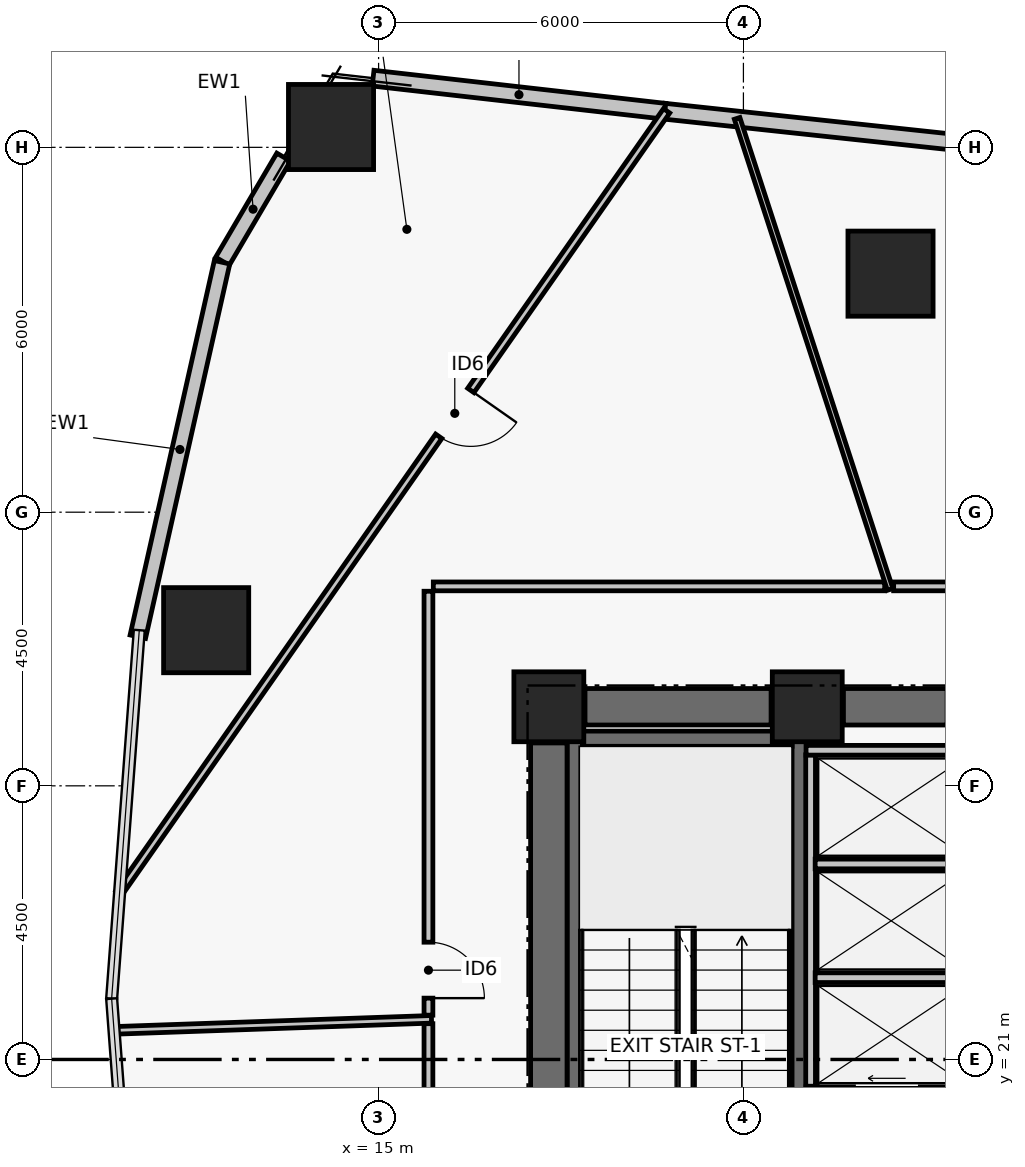
"""IFC4 building model, lengths in metres.
Left out: names, types, materials, properties, quantities, classifications, styles, units other than length and angle.
Written with IfcOpenShell. Run it as: python <this file> out.ifc"""

import sys

from ifc_helpers import new_model, si_unit, direction, frame, frame_2d, origin, origin_2d, place, context, subcontext, project, spatial, rectangle, hollow_rectangle, extrude, element, fill, save


model = new_model("IFC4")
c1 = context("Model", 3, precision=1e-05, world=origin(), true_north=direction((0.0, 1.0)))
c2 = subcontext(c1, "Body", "Model", "MODEL_VIEW")
j1 = project(units=[si_unit("LENGTHUNIT", "METRE"), si_unit("PLANEANGLEUNIT", "RADIAN")], contexts=[c1])
p1 = place(None, origin())
s1 = spatial("IfcSite", under=j1, at=p1, CompositionType="ELEMENT")
p2 = place(p1, origin())
s2 = spatial("IfcBuilding", under=s1, at=p2, CompositionType="ELEMENT")
p3 = place(p2, frame((0.0, 0.0, 61.08)))
s3 = spatial("IfcBuildingStorey", under=s2, at=p3, CompositionType="ELEMENT", Elevation=61.08)
for number, where, z_axis, x_axis in (
    (1, (17.8, 26.8, 0.0), (0.0, 0.0, 1.0), (1.0, 0.0, 0.0)),
    (2, (22.05, 26.8, 0.0), (0.0, 0.0, 1.0), (1.0, 0.0, 0.0)),
):
    element("IfcColumn", number, at=place(p3, frame(where, z_axis=z_axis, x_axis=x_axis)), inside=s3, PredefinedType="COLUMN", context=c2, shape_type="SweptSolid", body=[
        extrude(rectangle(XDim=1.15, YDim=1.15, at=origin_2d()), origin(), (0.0, 0.0, 1.0), 3.72),
    ])
p4 = place(p3, frame((18.395, 26.8, 0.0), z_axis=(0.0, 0.0, 1.0), x_axis=(1.0, 0.0, 0.0)))
e3 = element("IfcWall", 3, at=p4, inside=s3, PredefinedType="SHEAR", context=c2, shape_type="SweptSolid", body=[
    extrude(rectangle(XDim=3.06, YDim=0.6, at=frame_2d((1.53, 0.0))), origin(), (0.0, 0.0, 1.0), 3.47),
])
p5 = place(p3, frame((22.645, 26.8, 0.0), z_axis=(0.0, 0.0, 1.0), x_axis=(1.0, 0.0, 0.0)))
e4 = element("IfcWall", 4, at=p5, inside=s3, PredefinedType="SHEAR", context=c2, shape_type="SweptSolid", body=[
    extrude(rectangle(XDim=1.705, YDim=0.6, at=frame_2d((0.853, 0.0))), origin(), (0.0, 0.0, 1.0), 3.47),
])
p6 = place(p3, frame((17.8, 17.795, 0.0), z_axis=(0.0, 0.0, 1.0), x_axis=(0.0, 1.0, 0.0)))
e5 = element("IfcWall", 5, at=p6, inside=s3, PredefinedType="SHEAR", context=c2, shape_type="SweptSolid", body=[
    extrude(rectangle(XDim=8.41, YDim=0.6, at=frame_2d((4.205, 0.0))), origin(), (0.0, 0.0, 1.0), 3.47),
])
p7 = place(p3, frame((18.229, 17.6, 0.0), z_axis=(0.0, 0.0, 1.0), x_axis=(0.0, 1.0, 0.0)))
e6 = element("IfcWall", 6, at=p7, inside=s3, PredefinedType="SHEAR", context=c2, shape_type="SweptSolid", body=[
    extrude(rectangle(XDim=8.8, YDim=0.25, at=frame_2d((4.4, 0.0))), origin(), (0.0, 0.0, 1.0), 3.47),
])
p8 = place(p3, frame((21.925, 17.6, 0.0), z_axis=(0.0, 0.0, 1.0), x_axis=(0.0, 1.0, 0.0)))
e7 = element("IfcWall", 7, at=p8, inside=s3, PredefinedType="SHEAR", context=c2, shape_type="SweptSolid", body=[
    extrude(rectangle(XDim=8.8, YDim=0.25, at=frame_2d((4.4, 0.0))), origin(), (0.0, 0.0, 1.0), 3.47),
])
p9 = place(p8, frame((0.35, 0.0, 0.0)))
e8 = element("IfcOpeningElement", 8, at=p9, cuts=e7, PredefinedType="OPENING", context=c2, shape_type="SweptSolid", body=[
    extrude(rectangle(XDim=1.05, YDim=2.08, at=frame_2d((0.525, 1.04))), frame((0.0, 0.135, 0.0), z_axis=(0.0, -1.0, 0.0), x_axis=(1.0, 0.0, 0.0)), (0.0, 0.0, 1.0), 0.27),
])
p10 = place(p3, frame((18.354, 26.275, 0.0), z_axis=(0.0, 0.0, 1.0), x_axis=(1.0, 0.0, 0.0)))
e9 = element("IfcWall", 9, at=p10, inside=s3, PredefinedType="SHEAR", context=c2, shape_type="SweptSolid", body=[
    extrude(rectangle(XDim=3.446, YDim=0.25, at=frame_2d((1.723, 0.0))), origin(), (0.0, 0.0, 1.0), 3.47),
])
for number, where, z_axis, x_axis in (
    (10, (23.419, 33.923, 0.0), (0.0, 0.0, 1.0), (1.0, 0.0, 0.0)),
    (11, (14.218, 36.334, 0.0), (0.0, 0.0, 1.0), (1.0, 0.0, 0.0)),
    (12, (12.164, 28.06, 0.0), (0.0, 0.0, 1.0), (1.0, 0.0, 0.0)),
):
    element("IfcColumn", number, at=place(p3, frame(where, z_axis=z_axis, x_axis=x_axis)), inside=s3, PredefinedType="COLUMN", context=c2, shape_type="SweptSolid", body=[
        extrude(hollow_rectangle(XDim=1.4, YDim=1.4, WallThickness=0.055, at=origin_2d()), origin(), (0.0, 0.0, 1.0), 3.72),
    ])
p11 = place(p3, frame((19.696, 36.595, 0.0), z_axis=(0.0, 0.0, 1.0), x_axis=(0.994319088673, -0.106440358419, 0.0)))
e13 = element("IfcWall", 13, at=p11, inside=s3, PredefinedType="PARTITIONING", context=c2, shape_type="SweptSolid", body=[
    extrude(rectangle(XDim=9.757, YDim=0.26, at=frame_2d((4.879, 0.0))), origin(), (0.0, 0.0, 1.0), 3.47),
])
p12 = place(p3, frame((14.909, 37.138, 0.0), z_axis=(0.0, 0.0, 1.0), x_axis=(0.993630237788, -0.112689620435, 0.0)))
e14 = element("IfcWall", 14, at=p12, inside=s3, PredefinedType="PARTITIONING", context=c2, shape_type="SweptSolid", body=[
    extrude(rectangle(XDim=4.829, YDim=0.26, at=frame_2d((2.415, 0.0))), origin(), (0.0, 0.0, 1.0), 3.47),
])
p13 = place(p3, frame((12.432, 34.127, 0.0), z_axis=(0.0, 0.0, 1.0), x_axis=(0.506772954594, 0.862079562739, 0.0)))
e15 = element("IfcWall", 15, at=p13, inside=s3, PredefinedType="PARTITIONING", context=c2, shape_type="SweptSolid", body=[
    extrude(rectangle(XDim=1.986, YDim=0.26, at=frame_2d((0.993, 0.0))), origin(), (0.0, 0.0, 1.0), 3.47),
])
p14 = place(p3, frame((11.04, 27.952, 0.0), z_axis=(0.0, 0.0, 1.0), x_axis=(0.219505752381, 0.975611205692, 0.0)))
e16 = element("IfcWall", 16, at=p14, inside=s3, PredefinedType="PARTITIONING", context=c2, shape_type="SweptSolid", body=[
    extrude(rectangle(XDim=6.312, YDim=0.26, at=frame_2d((3.156, 0.0))), origin(), (0.0, 0.0, 1.0), 3.47),
])
p15 = place(p3, frame((22.03, 20.45, 0.0), z_axis=(0.0, 0.0, 1.0), x_axis=(1.0, 0.0, 0.0)))
e17 = element("IfcWall", 17, at=p15, inside=s3, PredefinedType="PARTITIONING", context=c2, shape_type="SweptSolid", body=[
    extrude(rectangle(XDim=2.8, YDim=0.2, at=frame_2d((1.4, 0.0))), origin(), (0.0, 0.0, 1.0), 3.47),
])
p16 = place(p15, frame((0.78, 0.0, 0.0)))
e18 = element("IfcOpeningElement", 18, at=p16, cuts=e17, PredefinedType="OPENING", context=c2, shape_type="SweptSolid", body=[
    extrude(rectangle(XDim=1.1, YDim=2.08, at=frame_2d((0.55, 1.04))), frame((0.0, 0.11, 0.0), z_axis=(0.0, -1.0, 0.0), x_axis=(1.0, 0.0, 0.0)), (0.0, 0.0, 1.0), 0.22),
])
p17 = place(p3, frame((22.105, 20.56, 0.0), z_axis=(0.0, 0.0, 1.0), x_axis=(0.0, 1.0, 0.0)))
e19 = element("IfcWall", 19, at=p17, inside=s3, PredefinedType="PARTITIONING", context=c2, shape_type="SweptSolid", body=[
    extrude(rectangle(XDim=5.45, YDim=0.16, at=frame_2d((2.725, 0.0))), origin(), (0.0, 0.0, 1.0), 3.47),
])
p18 = place(p3, frame((22.18, 22.345, 0.0), z_axis=(0.0, 0.0, 1.0), x_axis=(1.0, 0.0, 0.0)))
e20 = element("IfcWall", 20, at=p18, inside=s3, PredefinedType="PARTITIONING", context=c2, shape_type="SweptSolid", body=[
    extrude(rectangle(XDim=2.65, YDim=0.16, at=frame_2d((1.325, 0.0))), origin(), (0.0, 0.0, 1.0), 3.47),
])
p19 = place(p3, frame((22.18, 24.215, 0.0), z_axis=(0.0, 0.0, 1.0), x_axis=(1.0, 0.0, 0.0)))
e21 = element("IfcWall", 21, at=p19, inside=s3, PredefinedType="PARTITIONING", context=c2, shape_type="SweptSolid", body=[
    extrude(rectangle(XDim=2.49, YDim=0.16, at=frame_2d((1.245, 0.0))), origin(), (0.0, 0.0, 1.0), 3.47),
])
p20 = place(p3, frame((22.03, 26.085, 0.0), z_axis=(0.0, 0.0, 1.0), x_axis=(1.0, 0.0, 0.0)))
e22 = element("IfcWall", 22, at=p20, inside=s3, PredefinedType="PARTITIONING", context=c2, shape_type="SweptSolid", body=[
    extrude(rectangle(XDim=2.83, YDim=0.16, at=frame_2d((1.415, 0.0))), origin(), (0.0, 0.0, 1.0), 3.47),
])
p21 = place(p3, frame((15.82, 21.588, 0.0), z_axis=(0.0, 0.0, 1.0), x_axis=(0.0, -1.0, 0.0)))
e23 = element("IfcWall", 23, at=p21, inside=s3, PredefinedType="PARTITIONING", context=c2, shape_type="SweptSolid", body=[
    extrude(rectangle(XDim=8.298, YDim=0.145, at=frame_2d((4.149, 0.0))), origin(), (0.0, 0.0, 1.0), 2.6),
])
p22 = place(p3, frame((32.8, 28.78, 0.0), z_axis=(0.0, 0.0, 1.0), x_axis=(-1.0, 0.0, 0.0)))
e24 = element("IfcWall", 24, at=p22, inside=s3, PredefinedType="PARTITIONING", context=c2, shape_type="SweptSolid", body=[
    extrude(rectangle(XDim=9.329, YDim=0.145, at=frame_2d((4.665, 0.0))), origin(), (0.0, 0.0, 1.0), 3.0),
])
p23 = place(p22, frame((7.148, 0.0, 0.0)))
e25 = element("IfcOpeningElement", 25, at=p23, cuts=e24, PredefinedType="OPENING", context=c2, shape_type="SweptSolid", body=[
    extrude(rectangle(XDim=0.92, YDim=2.05, at=frame_2d((0.46, 1.025))), frame((0.0, 0.083, 0.0), z_axis=(0.0, -1.0, 0.0), x_axis=(1.0, 0.0, 0.0)), (0.0, 0.0, 1.0), 0.165),
])
p24 = place(p3, frame((23.323, 28.78, 0.0), z_axis=(0.0, 0.0, 1.0), x_axis=(-1.0, 0.0, 0.0)))
e26 = element("IfcWall", 26, at=p24, inside=s3, PredefinedType="PARTITIONING", context=c2, shape_type="SweptSolid", body=[
    extrude(rectangle(XDim=7.424, YDim=0.145, at=frame_2d((3.712, 0.0))), origin(), (0.0, 0.0, 1.0), 2.6),
])
p25 = place(p3, frame((15.82, 28.7, 0.0), z_axis=(0.0, 0.0, 1.0), x_axis=(0.0, -1.0, 0.0)))
e27 = element("IfcWall", 27, at=p25, inside=s3, PredefinedType="PARTITIONING", context=c2, shape_type="SweptSolid", body=[
    extrude(rectangle(XDim=6.971, YDim=0.145, at=frame_2d((3.486, 0.0))), origin(), (0.0, 0.0, 1.0), 2.6),
])
p26 = place(p25, frame((5.771, 0.0, 0.0)))
e28 = element("IfcOpeningElement", 28, at=p26, cuts=e27, PredefinedType="OPENING", context=c2, shape_type="SweptSolid", body=[
    extrude(rectangle(XDim=0.92, YDim=2.05, at=frame_2d((0.46, 1.025))), frame((0.0, 0.083, 0.0), z_axis=(0.0, -1.0, 0.0), x_axis=(1.0, 0.0, 0.0)), (0.0, 0.0, 1.0), 0.165),
])
p27 = place(p3, frame((23.413, 28.73, 0.0), z_axis=(0.0, 0.0, 1.0), x_axis=(-0.309033883912, 0.951051028386, 0.0)))
e29 = element("IfcWall", 29, at=p27, inside=s3, PredefinedType="PARTITIONING", context=c2, shape_type="SweptSolid", body=[
    extrude(rectangle(XDim=8.145, YDim=0.095, at=frame_2d((4.073, 0.0))), origin(), (0.0, 0.0, 1.0), 2.6),
])
p28 = place(p3, frame((15.87, 21.66, 0.0), z_axis=(0.0, 0.0, 1.0), x_axis=(-0.999391229301, -0.034887974962, 0.0)))
e30 = element("IfcWall", 30, at=p28, inside=s3, PredefinedType="PARTITIONING", context=c2, shape_type="SweptSolid", body=[
    extrude(rectangle(XDim=5.234, YDim=0.125, at=frame_2d((2.617, 0.0))), origin(), (0.0, 0.0, 1.0), 2.85),
])
p29 = place(p3, frame((19.737, 36.601, 0.0), z_axis=(0.0, 0.0, 1.0), x_axis=(-0.573585467262, -0.819145720703, 0.0)))
e31 = element("IfcWall", 31, at=p29, inside=s3, PredefinedType="PARTITIONING", context=c2, shape_type="SweptSolid", body=[
    extrude(rectangle(XDim=15.703, YDim=0.125, at=frame_2d((7.851, 0.0))), origin(), (0.0, 0.0, 1.0), 2.6),
])
p30 = place(p29, frame((5.614, 0.0, 0.0)))
e32 = element("IfcOpeningElement", 32, at=p30, cuts=e31, PredefinedType="OPENING", context=c2, shape_type="SweptSolid", body=[
    extrude(rectangle(XDim=0.92, YDim=2.05, at=frame_2d((0.46, 1.025))), frame((0.0, 0.073, 0.0), z_axis=(0.0, -1.0, 0.0), x_axis=(1.0, 0.0, 0.0)), (0.0, 0.0, 1.0), 0.145),
])
p31 = place(p26, origin())
e33 = element("IfcDoor", 33, at=p31, inside=s3, OperationType="SINGLE_SWING_RIGHT", PredefinedType="DOOR", context=c2, shape_type="SweptSolid", body=[
    extrude(rectangle(XDim=0.92, YDim=2.05, at=frame_2d((0.46, 1.025))), frame((0.0, 0.025, 0.0), z_axis=(0.0, -1.0, 0.0), x_axis=(1.0, 0.0, 0.0)), (0.0, 0.0, 1.0), 0.05),
])
fill(e28, e33)
p32 = place(p30, origin())
e34 = element("IfcDoor", 34, at=p32, inside=s3, OperationType="SINGLE_SWING_LEFT", PredefinedType="DOOR", context=c2, shape_type="SweptSolid", body=[
    extrude(rectangle(XDim=0.92, YDim=2.05, at=frame_2d((0.46, 1.025))), frame((0.0, 0.025, 0.0), z_axis=(0.0, -1.0, 0.0), x_axis=(1.0, 0.0, 0.0)), (0.0, 0.0, 1.0), 0.05),
])
fill(e32, e34)
save(model, sys.argv[1])
